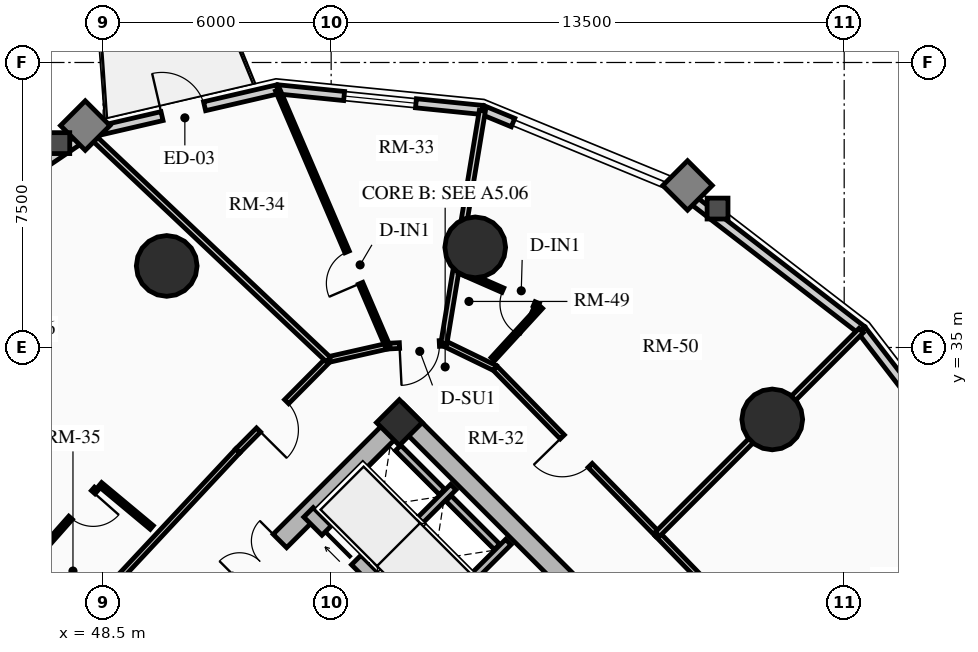
"""IFC4 building model, lengths in metres.
Left out: names, types, materials, properties, quantities, classifications, styles, units other than length and angle.
Written with IfcOpenShell. Run it as: python <this file> out.ifc"""

import sys

from ifc_helpers import new_model, si_unit, direction, frame, frame_2d, origin, origin_2d, place, context, subcontext, project, spatial, rectangle, circle, extrude, source, transform, mapped, element, fill, save


model = new_model("IFC4")
c1 = context("Model", 3, precision=1e-05, world=origin(), true_north=direction((0.0, 1.0)))
c2 = subcontext(c1, "Body", "Model", "MODEL_VIEW")
j1 = project(units=[si_unit("LENGTHUNIT", "METRE"), si_unit("PLANEANGLEUNIT", "RADIAN")], contexts=[c1])
p1 = place(None, origin())
s1 = spatial("IfcSite", under=j1, at=p1, CompositionType="ELEMENT")
p2 = place(p1, origin())
s2 = spatial("IfcBuilding", under=s1, at=p2, CompositionType="ELEMENT")
p3 = place(p2, frame((0.0, 0.0, 30.73)))
s3 = spatial("IfcBuildingStorey", under=s2, at=p3, CompositionType="ELEMENT", Elevation=30.73)
p4 = place(p3, frame((66.339, 23.227, 0.0), z_axis=(0.0, 0.0, 1.0), x_axis=(-0.707106781187, 0.707106781187, 0.0)))
e1 = element("IfcWall", 1, at=p4, inside=s3, PredefinedType="SHEAR", context=c2, shape_type="SweptSolid", body=[
    extrude(rectangle(XDim=14.3, YDim=0.5, at=frame_2d((7.15, 0.0))), origin(), (0.0, 0.0, 1.0), 2.91),
])
p5 = place(p3, frame((48.838, 25.596, 0.0), z_axis=(0.0, 0.0, 1.0), x_axis=(0.707106781187, 0.707106781187, 0.0)))
e2 = element("IfcWall", 2, at=p5, inside=s3, PredefinedType="SHEAR", context=c2, shape_type="SweptSolid", body=[
    extrude(rectangle(XDim=10.7, YDim=0.5, at=frame_2d((5.35, 0.0))), origin(), (0.0, 0.0, 1.0), 2.91),
])
m1 = source(origin(), c2, "Body", "SweptSolid", [
    extrude(rectangle(XDim=1.5, YDim=2.02, at=frame_2d((0.75, 1.01))), frame((0.0, 0.26, 0.0), z_axis=(0.0, -1.0, 0.0), x_axis=(1.0, 0.0, 0.0)), (0.0, 0.0, 1.0), 0.52),
])
p6 = place(p5, frame((4.6, 0.0, 0.0)))
e3 = element("IfcOpeningElement", 3, at=p6, cuts=e2, PredefinedType="OPENING", context=c2, shape_type="MappedRepresentation", body=[
    mapped(m1, transform((0.0, 0.0, 0.0), x_axis=(1.0, 0.0, 0.0), y_axis=(0.0, 1.0, 0.0), z_axis=(0.0, 0.0, 1.0), scale=1.0)),
])
p7 = place(p3, frame((63.662, 20.904, 0.0), z_axis=(0.0, 0.0, 1.0), x_axis=(-0.707106781187, 0.707106781187, 0.0)))
e4 = element("IfcWall", 4, at=p7, inside=s3, PredefinedType="SHEAR", context=c2, shape_type="SweptSolid", body=[
    extrude(rectangle(XDim=13.8, YDim=0.35, at=frame_2d((6.9, 0.0))), origin(), (0.0, 0.0, 1.0), 2.91),
])
m2 = source(origin(), c2, "Body", "SweptSolid", [
    extrude(rectangle(XDim=1.1, YDim=2.015, at=frame_2d((0.55, 1.007))), frame((0.0, 0.185, 0.0), z_axis=(0.0, -1.0, 0.0), x_axis=(1.0, 0.0, 0.0)), (0.0, 0.0, 1.0), 0.37),
])
p8 = place(p7, frame((10.025, 0.0, 0.0)))
e5 = element("IfcOpeningElement", 5, at=p8, cuts=e4, PredefinedType="OPENING", context=c2, shape_type="MappedRepresentation", body=[
    mapped(m2, transform((0.0, 0.0, 0.0), x_axis=(1.0, 0.0, 0.0), y_axis=(0.0, 1.0, 0.0), z_axis=(0.0, 0.0, 1.0), scale=1.0)),
])
p9 = place(p7, frame((12.025, 0.0, 0.0)))
e6 = element("IfcOpeningElement", 6, at=p9, cuts=e4, PredefinedType="OPENING", context=c2, shape_type="MappedRepresentation", body=[
    mapped(m2, transform((0.0, 0.0, 0.0), x_axis=(1.0, 0.0, 0.0), y_axis=(0.0, 1.0, 0.0), z_axis=(0.0, 0.0, 1.0), scale=1.0)),
])
m3 = source(origin(), c2, "Body", "SweptSolid", [
    extrude(rectangle(XDim=1.15, YDim=2.02, at=frame_2d((0.575, 1.01))), frame((0.0, 0.185, 0.0), z_axis=(0.0, -1.0, 0.0), x_axis=(1.0, 0.0, 0.0)), (0.0, 0.0, 1.0), 0.37),
])
p10 = place(p7, frame((5.33, 0.0, 0.0)))
e7 = element("IfcOpeningElement", 7, at=p10, cuts=e4, PredefinedType="OPENING", context=c2, shape_type="MappedRepresentation", body=[
    mapped(m3, transform((0.0, 0.0, 0.0), x_axis=(1.0, 0.0, 0.0), y_axis=(0.0, 1.0, 0.0), z_axis=(0.0, 0.0, 1.0), scale=1.0)),
])
p11 = place(p3, frame((56.294, 33.024, 0.0), z_axis=(0.0, 0.0, 1.0), x_axis=(0.707106781187, 0.707106781187, 0.0)))
e8 = element("IfcColumn", 8, at=p11, inside=s3, PredefinedType="COLUMN", context=c2, shape_type="SweptSolid", body=[
    extrude(rectangle(XDim=0.85, YDim=0.85, at=origin_2d()), origin(), (0.0, 0.0, 1.0), 2.91),
])
for number, where, z_axis, x_axis in (
    (9, (66.107, 33.107, 0.0), (0.0, 0.0, 1.0), (1.0, 0.0, 0.0)),
    (10, (58.291, 37.635, 0.0), (0.0, 0.0, 1.0), (1.0, 0.0, 0.0)),
    (11, (50.173, 37.146, 0.0), (0.0, 0.0, 1.0), (1.0, 0.0, 0.0)),
):
    element("IfcColumn", number, at=place(p3, frame(where, z_axis=z_axis, x_axis=x_axis)), inside=s3, PredefinedType="USERDEFINED", context=c2, shape_type="SweptSolid", body=[
        extrude(circle(Radius=0.8, at=origin_2d()), origin(), (0.0, 0.0, 1.0), 2.91),
    ])
p12 = place(p3, frame((63.778, 39.068, 0.0), z_axis=(0.0, 0.0, 1.0), x_axis=(0.792020182601, -0.610494906082, 0.0)))
e12 = element("IfcWall", 12, at=p12, inside=s3, PredefinedType="SOLIDWALL", context=c2, shape_type="SweptSolid", body=[
    extrude(rectangle(XDim=5.911, YDim=0.24, at=frame_2d((2.956, 0.0))), origin(), (0.0, 0.0, 1.0), 2.073),
])
p13 = place(p3, frame((58.482, 41.251, 0.0), z_axis=(0.0, 0.0, 1.0), x_axis=(0.924556017656, -0.381046152345, 0.0)))
e13 = element("IfcWall", 13, at=p13, inside=s3, PredefinedType="SOLIDWALL", context=c2, shape_type="SweptSolid", body=[
    extrude(rectangle(XDim=0.87, YDim=0.24, at=frame_2d((0.435, 0.0))), origin(), (0.0, 0.0, 1.0), 2.073),
])
p14 = place(p3, frame((53.09, 41.794, 0.0), z_axis=(0.0, 0.0, 1.0), x_axis=(0.994968263437, -0.100190592135, 0.0)))
e14 = element("IfcWall", 14, at=p14, inside=s3, PredefinedType="SOLIDWALL", context=c2, shape_type="SweptSolid", body=[
    extrude(rectangle(XDim=5.419, YDim=0.24, at=frame_2d((2.71, 0.0))), origin(), (0.0, 0.0, 1.0), 2.073),
])
m4 = source(origin(), c2, "Body", "SweptSolid", [
    extrude(rectangle(XDim=1.9, YDim=1.35, at=frame_2d((0.95, 0.675))), frame((0.0, 0.13, 0.0), z_axis=(0.0, -1.0, 0.0), x_axis=(1.0, 0.0, 0.0)), (0.0, 0.0, 1.0), 0.26),
])
p15 = place(p14, frame((1.76, 0.0, 0.65)))
e15 = element("IfcOpeningElement", 15, at=p15, cuts=e14, PredefinedType="OPENING", context=c2, shape_type="MappedRepresentation", body=[
    mapped(m4, transform((0.0, 0.0, 0.0), x_axis=(1.0, 0.0, 0.0), y_axis=(0.0, 1.0, 0.0), z_axis=(0.0, 0.0, 1.0), scale=1.0)),
])
p16 = place(p3, frame((48.129, 40.644, 0.0), z_axis=(0.0, 0.0, 1.0), x_axis=(0.974167686491, 0.22582585901, 0.0)))
e16 = element("IfcWall", 16, at=p16, inside=s3, PredefinedType="SOLIDWALL", context=c2, shape_type="SweptSolid", body=[
    extrude(rectangle(XDim=5.092, YDim=0.24, at=frame_2d((2.546, 0.0))), origin(), (0.0, 0.0, 1.0), 2.073),
])
m5 = source(origin(), c2, "Body", "SweptSolid", [
    extrude(rectangle(XDim=1.15, YDim=2.005, at=frame_2d((0.575, 1.002))), frame((0.0, 0.13, 0.0), z_axis=(0.0, -1.0, 0.0), x_axis=(1.0, 0.0, 0.0)), (0.0, 0.0, 1.0), 0.26),
])
p17 = place(p16, frame((1.971, 0.0, 0.0)))
e17 = element("IfcOpeningElement", 17, at=p17, cuts=e16, PredefinedType="OPENING", context=c2, shape_type="MappedRepresentation", body=[
    mapped(m5, transform((0.0, 0.0, 0.0), x_axis=(1.0, 0.0, 0.0), y_axis=(0.0, 1.0, 0.0), z_axis=(0.0, 0.0, 1.0), scale=1.0)),
])
p18 = place(p3, frame((44.086, 37.914, 0.0), z_axis=(0.0, 0.0, 1.0), x_axis=(0.828748297084, 0.559621532896, 0.0)))
e18 = element("IfcWall", 18, at=p18, inside=s3, PredefinedType="SOLIDWALL", context=c2, shape_type="SweptSolid", body=[
    extrude(rectangle(XDim=4.879, YDim=0.24, at=frame_2d((2.439, 0.0))), origin(), (0.0, 0.0, 1.0), 2.073),
])
p19 = place(p3, frame((68.459, 35.459, 0.0), z_axis=(0.0, 0.0, 1.0), x_axis=(0.610494906082, -0.792020182601, 0.0)))
e19 = element("IfcWall", 19, at=p19, inside=s3, PredefinedType="SOLIDWALL", context=c2, shape_type="SweptSolid", body=[
    extrude(rectangle(XDim=5.911, YDim=0.24, at=frame_2d((2.956, 0.0))), origin(), (0.0, 0.0, 1.0), 2.073),
])
m6 = source(origin(), c2, "Body", "SweptSolid", [
    extrude(rectangle(XDim=2.2, YDim=1.35, at=frame_2d((1.1, 0.675))), frame((0.0, 0.13, 0.0), z_axis=(0.0, -1.0, 0.0), x_axis=(1.0, 0.0, 0.0)), (0.0, 0.0, 1.0), 0.26),
])
p20 = place(p19, frame((1.855, 0.0, 0.65)))
e20 = element("IfcOpeningElement", 20, at=p20, cuts=e19, PredefinedType="OPENING", context=c2, shape_type="MappedRepresentation", body=[
    mapped(m6, transform((0.0, 0.0, 0.0), x_axis=(1.0, 0.0, 0.0), y_axis=(0.0, 1.0, 0.0), z_axis=(0.0, 0.0, 1.0), scale=1.0)),
])
p21 = place(p3, frame((57.062, 27.781, 0.0), z_axis=(0.0, 0.0, 1.0), x_axis=(0.707106781187, 0.707106781187, 0.0)))
e21 = element("IfcWall", 21, at=p21, inside=s3, PredefinedType="SHEAR", context=c2, shape_type="SweptSolid", body=[
    extrude(rectangle(XDim=2.97, YDim=0.2, at=frame_2d((1.485, 0.0))), origin(), (0.0, 0.0, 1.0), 2.91),
])
p22 = place(p3, frame((55.615, 29.227, 0.0), z_axis=(0.0, 0.0, 1.0), x_axis=(0.707147878904, 0.70706568108, 0.0)))
e22 = element("IfcWall", 22, at=p22, inside=s3, PredefinedType="SHEAR", context=c2, shape_type="SweptSolid", body=[
    extrude(rectangle(XDim=2.97, YDim=0.2, at=frame_2d((1.485, 0.0))), origin(), (0.0, 0.0, 1.0), 2.91),
])
p23 = place(p3, frame((58.865, 29.754, 0.0), z_axis=(0.0, 0.0, 1.0), x_axis=(-0.707174411312, 0.707039144592, 0.0)))
e23 = element("IfcWall", 23, at=p23, inside=s3, PredefinedType="SHEAR", context=c2, shape_type="SweptSolid", body=[
    extrude(rectangle(XDim=1.805, YDim=0.2, at=frame_2d((0.902, 0.0))), origin(), (0.0, 0.0, 1.0), 2.91),
])
p24 = place(p3, frame((57.419, 31.2, 0.0), z_axis=(0.0, 0.0, 1.0), x_axis=(-0.707032117043, 0.707181437447, 0.0)))
e24 = element("IfcWall", 24, at=p24, inside=s3, PredefinedType="SHEAR", context=c2, shape_type="SweptSolid", body=[
    extrude(rectangle(XDim=1.635, YDim=0.2, at=frame_2d((0.817, 0.0))), origin(), (0.0, 0.0, 1.0), 2.91),
])
p25 = place(p3, frame((63.086, 30.086, 0.0), z_axis=(0.0, 0.0, 1.0), x_axis=(-0.699075897379, 0.715047473741, 0.0)))
e25 = element("IfcWall", 25, at=p25, inside=s3, PredefinedType="PARTITIONING", context=c2, shape_type="SweptSolid", body=[
    extrude(rectangle(XDim=6.114, YDim=0.15, at=frame_2d((3.057, 0.0))), origin(), (0.0, 0.0, 1.0), 2.159),
])
m7 = source(origin(), c2, "Body", "SweptSolid", [
    extrude(rectangle(XDim=1.05, YDim=2.015, at=frame_2d((0.525, 1.007))), frame((0.0, 0.085, 0.0), z_axis=(0.0, -1.0, 0.0), x_axis=(1.0, 0.0, 0.0)), (0.0, 0.0, 1.0), 0.17),
])
p26 = place(p25, frame((2.532, 0.0, 0.0)))
e26 = element("IfcOpeningElement", 26, at=p26, cuts=e25, PredefinedType="OPENING", context=c2, shape_type="MappedRepresentation", body=[
    mapped(m7, transform((0.0, 0.0, 0.0), x_axis=(1.0, 0.0, 0.0), y_axis=(0.0, 1.0, 0.0), z_axis=(0.0, 0.0, 1.0), scale=1.0)),
])
p27 = place(p3, frame((58.812, 34.458, 0.0), z_axis=(0.0, 0.0, 1.0), x_axis=(-0.899559490277, 0.436798264021, 0.0)))
e27 = element("IfcWall", 27, at=p27, inside=s3, PredefinedType="PARTITIONING", context=c2, shape_type="SweptSolid", body=[
    extrude(rectangle(XDim=1.495, YDim=0.15, at=frame_2d((0.748, 0.0))), origin(), (0.0, 0.0, 1.0), 2.205),
])
p28 = place(p3, frame((57.467, 35.111, 0.0), z_axis=(0.0, 0.0, 1.0), x_axis=(-0.998691757323, -0.051134859488, 0.0)))
e28 = element("IfcWall", 28, at=p28, inside=s3, PredefinedType="PARTITIONING", context=c2, shape_type="SweptSolid", body=[
    extrude(rectangle(XDim=1.485, YDim=0.15, at=frame_2d((0.742, 0.0))), origin(), (0.0, 0.0, 1.0), 2.159),
])
p29 = place(p28, frame((0.12, 0.0, 0.0)))
e29 = element("IfcOpeningElement", 29, at=p29, cuts=e28, PredefinedType="OPENING", context=c2, shape_type="MappedRepresentation", body=[
    mapped(m7, transform((0.0, 0.0, 0.0), x_axis=(1.0, 0.0, 0.0), y_axis=(0.0, 1.0, 0.0), z_axis=(0.0, 0.0, 1.0), scale=1.0)),
])
p30 = place(p3, frame((55.984, 35.035, 0.0), z_axis=(0.0, 0.0, 1.0), x_axis=(-0.975290305708, -0.22092718165, 0.0)))
e30 = element("IfcWall", 30, at=p30, inside=s3, PredefinedType="PARTITIONING", context=c2, shape_type="SweptSolid", body=[
    extrude(rectangle(XDim=1.597, YDim=0.15, at=frame_2d((0.798, 0.0))), origin(), (0.0, 0.0, 1.0), 2.205),
])
p31 = place(p3, frame((54.427, 34.683, 0.0), z_axis=(0.0, 0.0, 1.0), x_axis=(-0.704178989986, -0.710022499687, 0.0)))
e31 = element("IfcWall", 31, at=p31, inside=s3, PredefinedType="PARTITIONING", context=c2, shape_type="SweptSolid", body=[
    extrude(rectangle(XDim=3.384, YDim=0.15, at=frame_2d((1.692, 0.0))), origin(), (0.0, 0.0, 1.0), 2.159),
])
p32 = place(p31, frame((1.56, 0.0, 0.0)))
e32 = element("IfcOpeningElement", 32, at=p32, cuts=e31, PredefinedType="OPENING", context=c2, shape_type="MappedRepresentation", body=[
    mapped(m7, transform((0.0, 0.0, 0.0), x_axis=(1.0, 0.0, 0.0), y_axis=(0.0, 1.0, 0.0), z_axis=(0.0, 0.0, 1.0), scale=1.0)),
])
p33 = place(p3, frame((52.043, 32.28, 0.0), z_axis=(0.0, 0.0, 1.0), x_axis=(-0.682606081633, -0.730786519661, 0.0)))
e33 = element("IfcWall", 33, at=p33, inside=s3, PredefinedType="PARTITIONING", context=c2, shape_type="SweptSolid", body=[
    extrude(rectangle(XDim=6.527, YDim=0.15, at=frame_2d((3.263, 0.0))), origin(), (0.0, 0.0, 1.0), 2.159),
])
p34 = place(p3, frame((67.27, 25.78, 0.0), z_axis=(0.0, 0.0, 1.0), x_axis=(-0.696847842907, 0.717218992942, 0.0)))
e34 = element("IfcWall", 34, at=p34, inside=s3, PredefinedType="PARTITIONING", context=c2, shape_type="SweptSolid", body=[
    extrude(rectangle(XDim=6.004, YDim=0.15, at=frame_2d((3.002, 0.0))), origin(), (0.0, 0.0, 1.0), 2.635),
])
m8 = source(origin(), c2, "Body", "SweptSolid", [
    extrude(rectangle(XDim=1.0, YDim=2.015, at=frame_2d((0.5, 1.007))), frame((0.0, 0.085, 0.0), z_axis=(0.0, -1.0, 0.0), x_axis=(1.0, 0.0, 0.0)), (0.0, 0.0, 1.0), 0.17),
])
p35 = place(p34, frame((2.502, 0.0, 0.0)))
e35 = element("IfcOpeningElement", 35, at=p35, cuts=e34, PredefinedType="OPENING", context=c2, shape_type="MappedRepresentation", body=[
    mapped(m8, transform((0.0, 0.0, 0.0), x_axis=(1.0, 0.0, 0.0), y_axis=(0.0, 1.0, 0.0), z_axis=(0.0, 0.0, 1.0), scale=1.0)),
])
p36 = place(p3, frame((63.086, 30.086, 0.0), z_axis=(0.0, 0.0, 1.0), x_axis=(0.707106781187, 0.707106781187, 0.0)))
e36 = element("IfcWall", 36, at=p36, inside=s3, PredefinedType="PARTITIONING", context=c2, shape_type="SweptSolid", body=[
    extrude(rectangle(XDim=7.579, YDim=0.16, at=frame_2d((3.79, 0.0))), origin(), (0.0, 0.0, 1.0), 2.073),
])
p37 = place(p3, frame((57.467, 35.111, 0.0), z_axis=(0.0, 0.0, 1.0), x_axis=(0.163141505202, 0.986602680556, 0.0)))
e37 = element("IfcWall", 37, at=p37, inside=s3, PredefinedType="PARTITIONING", context=c2, shape_type="SweptSolid", body=[
    extrude(rectangle(XDim=6.203, YDim=0.16, at=frame_2d((3.102, 0.0))), origin(), (0.0, 0.0, 1.0), 2.073),
])
p38 = place(p3, frame((54.427, 34.683, 0.0), z_axis=(0.0, 0.0, 1.0), x_axis=(-0.726732956694, 0.686920089716, 0.0)))
e38 = element("IfcWall", 38, at=p38, inside=s3, PredefinedType="PARTITIONING", context=c2, shape_type="SweptSolid", body=[
    extrude(rectangle(XDim=8.653, YDim=0.16, at=frame_2d((4.326, 0.0))), origin(), (0.0, 0.0, 1.0), 2.073),
])
p39 = place(p3, frame((47.588, 27.51, 0.0), z_axis=(0.0, 0.0, 1.0), x_axis=(-0.699371977892, 0.714757886657, 0.0)))
e39 = element("IfcWall", 39, at=p39, inside=s3, PredefinedType="PARTITIONING", context=c2, shape_type="SweptSolid", body=[
    extrude(rectangle(XDim=8.886, YDim=0.16, at=frame_2d((4.443, 0.0))), origin(), (0.0, 0.0, 1.0), 2.073),
])
p40 = place(p3, frame((55.984, 35.035, 0.0), z_axis=(0.0, 0.0, 1.0), x_axis=(-0.394244760106, 0.919005478291, 0.0)))
e40 = element("IfcWall", 40, at=p40, inside=s3, PredefinedType="PARTITIONING", context=c2, shape_type="SweptSolid", body=[
    extrude(rectangle(XDim=7.333, YDim=0.125, at=frame_2d((3.667, 0.0))), origin(), (0.0, 0.0, 1.0), 2.073),
])
m9 = source(origin(), c2, "Body", "SweptSolid", [
    extrude(rectangle(XDim=0.9, YDim=2.005, at=frame_2d((0.45, 1.002))), frame((0.0, 0.073, 0.0), z_axis=(0.0, -1.0, 0.0), x_axis=(1.0, 0.0, 0.0)), (0.0, 0.0, 1.0), 0.145),
])
p41 = place(p40, frame((1.8, 0.0, 0.0)))
e41 = element("IfcOpeningElement", 41, at=p41, cuts=e40, PredefinedType="OPENING", context=c2, shape_type="MappedRepresentation", body=[
    mapped(m9, transform((0.0, 0.0, 0.0), x_axis=(1.0, 0.0, 0.0), y_axis=(0.0, 1.0, 0.0), z_axis=(0.0, 0.0, 1.0), scale=1.0)),
])
p42 = place(p3, frame((49.78, 30.264, 0.0), z_axis=(0.0, 0.0, 1.0), x_axis=(-0.768209972595, 0.640197967824, 0.0)))
e42 = element("IfcWall", 42, at=p42, inside=s3, PredefinedType="PARTITIONING", context=c2, shape_type="SweptSolid", body=[
    extrude(rectangle(XDim=1.77, YDim=0.125, at=frame_2d((0.885, 0.0))), origin(), (0.0, 0.0, 1.0), 2.635),
])
p43 = place(p3, frame((48.318, 31.282, 0.0), z_axis=(0.0, 0.0, 1.0), x_axis=(-0.662365127428, -0.749181178333, 0.0)))
e43 = element("IfcWall", 43, at=p43, inside=s3, PredefinedType="PARTITIONING", context=c2, shape_type="SweptSolid", body=[
    extrude(rectangle(XDim=2.953, YDim=0.125, at=frame_2d((1.477, 0.0))), origin(), (0.0, 0.0, 1.0), 2.159),
])
p44 = place(p43, frame((0.12, 0.0, 0.0)))
e44 = element("IfcOpeningElement", 44, at=p44, cuts=e43, PredefinedType="OPENING", context=c2, shape_type="MappedRepresentation", body=[
    mapped(m9, transform((0.0, 0.0, 0.0), x_axis=(1.0, 0.0, 0.0), y_axis=(0.0, 1.0, 0.0), z_axis=(0.0, 0.0, 1.0), scale=1.0)),
])
p45 = place(p3, frame((58.756, 34.694, 0.0), z_axis=(0.0, 0.0, 1.0), x_axis=(0.675641726749, 0.73723012491, 0.0)))
e45 = element("IfcWall", 45, at=p45, inside=s3, PredefinedType="PARTITIONING", context=c2, shape_type="SweptSolid", body=[
    extrude(rectangle(XDim=1.867, YDim=0.125, at=frame_2d((0.934, 0.0))), origin(), (0.0, 0.0, 1.0), 2.205),
])
p46 = place(p3, frame((59.952, 36.099, 0.0), z_axis=(0.0, 0.0, 1.0), x_axis=(-0.915914750605, 0.401372856113, 0.0)))
e46 = element("IfcWall", 46, at=p46, inside=s3, PredefinedType="PARTITIONING", context=c2, shape_type="SweptSolid", body=[
    extrude(rectangle(XDim=2.265, YDim=0.125, at=frame_2d((1.133, 0.0))), origin(), (0.0, 0.0, 1.0), 2.159),
])
p47 = place(p46, frame((0.12, 0.0, 0.0)))
e47 = element("IfcOpeningElement", 47, at=p47, cuts=e46, PredefinedType="OPENING", context=c2, shape_type="MappedRepresentation", body=[
    mapped(m9, transform((0.0, 0.0, 0.0), x_axis=(1.0, 0.0, 0.0), y_axis=(0.0, 1.0, 0.0), z_axis=(0.0, 0.0, 1.0), scale=1.0)),
])
m10 = source(origin(), c2, "Body", "SweptSolid", [
    extrude(rectangle(XDim=1.9, YDim=1.35, at=frame_2d((0.95, 0.675))), frame((0.0, 0.03, 0.0), z_axis=(0.0, -1.0, 0.0), x_axis=(1.0, 0.0, 0.0)), (0.0, 0.0, 1.0), 0.06),
])
p48 = place(p15, origin())
e48 = element("IfcWindow", 48, at=p48, inside=s3, PartitioningType="DOUBLE_PANEL_VERTICAL", PredefinedType="WINDOW", context=c2, shape_type="MappedRepresentation", body=[
    mapped(m10, transform((0.0, 0.0, 0.0), x_axis=(1.0, 0.0, 0.0), y_axis=(0.0, 1.0, 0.0), z_axis=(0.0, 0.0, 1.0), scale=1.0)),
])
fill(e15, e48)
m11 = source(origin(), c2, "Body", "SweptSolid", [
    extrude(rectangle(XDim=1.15, YDim=2.005, at=frame_2d((0.575, 1.002))), frame((0.0, 0.025, 0.0), z_axis=(0.0, -1.0, 0.0), x_axis=(1.0, 0.0, 0.0)), (0.0, 0.0, 1.0), 0.05),
])
p49 = place(p17, origin())
e49 = element("IfcDoor", 49, at=p49, inside=s3, OperationType="SINGLE_SWING_LEFT", PredefinedType="DOOR", context=c2, shape_type="MappedRepresentation", body=[
    mapped(m11, transform((0.0, 0.0, 0.0), x_axis=(1.0, 0.0, 0.0), y_axis=(0.0, 1.0, 0.0), z_axis=(0.0, 0.0, 1.0), scale=1.0)),
])
fill(e17, e49)
m12 = source(origin(), c2, "Body", "SweptSolid", [
    extrude(rectangle(XDim=1.1, YDim=2.015, at=frame_2d((0.55, 1.007))), frame((0.0, 0.025, 0.0), z_axis=(0.0, -1.0, 0.0), x_axis=(1.0, 0.0, 0.0)), (0.0, 0.0, 1.0), 0.05),
])
p50 = place(p9, origin())
e50 = element("IfcDoor", 50, at=p50, inside=s3, OperationType="SLIDING_TO_RIGHT", PredefinedType="DOOR", context=c2, shape_type="MappedRepresentation", body=[
    mapped(m12, transform((0.0, 0.0, 0.0), x_axis=(1.0, 0.0, 0.0), y_axis=(0.0, 1.0, 0.0), z_axis=(0.0, 0.0, 1.0), scale=1.0)),
])
fill(e6, e50)
m13 = source(origin(), c2, "Body", "SweptSolid", [
    extrude(rectangle(XDim=1.5, YDim=2.02, at=frame_2d((0.75, 1.01))), frame((0.0, 0.025, 0.0), z_axis=(0.0, -1.0, 0.0), x_axis=(1.0, 0.0, 0.0)), (0.0, 0.0, 1.0), 0.05),
])
p51 = place(p6, origin())
e51 = element("IfcDoor", 51, at=p51, inside=s3, OperationType="DOUBLE_DOOR_SINGLE_SWING", PredefinedType="DOOR", context=c2, shape_type="MappedRepresentation", body=[
    mapped(m13, transform((0.0, 0.0, 0.0), x_axis=(1.0, 0.0, 0.0), y_axis=(0.0, 1.0, 0.0), z_axis=(0.0, 0.0, 1.0), scale=1.0)),
])
fill(e3, e51)
m14 = source(origin(), c2, "Body", "SweptSolid", [
    extrude(rectangle(XDim=1.05, YDim=2.015, at=frame_2d((0.525, 1.007))), frame((0.0, 0.025, 0.0), z_axis=(0.0, -1.0, 0.0), x_axis=(1.0, 0.0, 0.0)), (0.0, 0.0, 1.0), 0.05),
])
p52 = place(p29, origin())
e52 = element("IfcDoor", 52, at=p52, inside=s3, OperationType="SINGLE_SWING_RIGHT", PredefinedType="DOOR", context=c2, shape_type="MappedRepresentation", body=[
    mapped(m14, transform((0.0, 0.0, 0.0), x_axis=(1.0, 0.0, 0.0), y_axis=(0.0, 1.0, 0.0), z_axis=(0.0, 0.0, 1.0), scale=1.0)),
])
fill(e29, e52)
m15 = source(origin(), c2, "Body", "SweptSolid", [
    extrude(rectangle(XDim=0.9, YDim=2.005, at=frame_2d((0.45, 1.002))), frame((0.0, 0.025, 0.0), z_axis=(0.0, -1.0, 0.0), x_axis=(1.0, 0.0, 0.0)), (0.0, 0.0, 1.0), 0.05),
])
p53 = place(p41, origin())
e53 = element("IfcDoor", 53, at=p53, inside=s3, OperationType="SINGLE_SWING_LEFT", PredefinedType="DOOR", context=c2, shape_type="MappedRepresentation", body=[
    mapped(m15, transform((0.0, 0.0, 0.0), x_axis=(1.0, 0.0, 0.0), y_axis=(0.0, 1.0, 0.0), z_axis=(0.0, 0.0, 1.0), scale=1.0)),
])
fill(e41, e53)
p54 = place(p32, origin())
e54 = element("IfcDoor", 54, at=p54, inside=s3, OperationType="SINGLE_SWING_RIGHT", PredefinedType="DOOR", context=c2, shape_type="MappedRepresentation", body=[
    mapped(m14, transform((0.0, 0.0, 0.0), x_axis=(1.0, 0.0, 0.0), y_axis=(0.0, 1.0, 0.0), z_axis=(0.0, 0.0, 1.0), scale=1.0)),
])
fill(e32, e54)
p55 = place(p44, origin())
e55 = element("IfcDoor", 55, at=p55, inside=s3, OperationType="SINGLE_SWING_LEFT", PredefinedType="DOOR", context=c2, shape_type="MappedRepresentation", body=[
    mapped(m15, transform((0.0, 0.0, 0.0), x_axis=(1.0, 0.0, 0.0), y_axis=(0.0, 1.0, 0.0), z_axis=(0.0, 0.0, 1.0), scale=1.0)),
])
fill(e44, e55)
p56 = place(p26, origin())
e56 = element("IfcDoor", 56, at=p56, inside=s3, OperationType="SINGLE_SWING_RIGHT", PredefinedType="DOOR", context=c2, shape_type="MappedRepresentation", body=[
    mapped(m14, transform((0.0, 0.0, 0.0), x_axis=(1.0, 0.0, 0.0), y_axis=(0.0, 1.0, 0.0), z_axis=(0.0, 0.0, 1.0), scale=1.0)),
])
fill(e26, e56)
p57 = place(p47, origin())
e57 = element("IfcDoor", 57, at=p57, inside=s3, OperationType="SINGLE_SWING_LEFT", PredefinedType="DOOR", context=c2, shape_type="MappedRepresentation", body=[
    mapped(m15, transform((0.0, 0.0, 0.0), x_axis=(1.0, 0.0, 0.0), y_axis=(0.0, 1.0, 0.0), z_axis=(0.0, 0.0, 1.0), scale=1.0)),
])
fill(e47, e57)
save(model, sys.argv[1])
